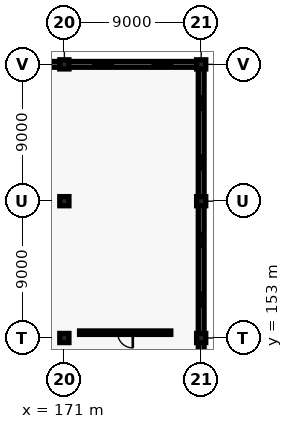
"""IFC4 building model, lengths in metres.
Left out: names, types, materials, properties, quantities, classifications, styles, units other than length and angle.
Written with IfcOpenShell. Run it as: python <this file> out.ifc"""

import sys

from ifc_helpers import new_model, si_unit, direction, frame, frame_2d, origin, origin_2d, place, context, subcontext, project, spatial, rectangle, extrude, element, fill, save


model = new_model("IFC4")
c1 = context("Model", 3, precision=1e-05, world=origin(), true_north=direction((0.0, 1.0)))
c2 = subcontext(c1, "Body", "Model", "MODEL_VIEW")
j1 = project(units=[si_unit("LENGTHUNIT", "METRE"), si_unit("PLANEANGLEUNIT", "RADIAN")], contexts=[c1])
p1 = place(None, origin())
s1 = spatial("IfcSite", under=j1, at=p1, CompositionType="ELEMENT")
p2 = place(p1, origin())
s2 = spatial("IfcBuilding", under=s1, at=p2, CompositionType="ELEMENT")
p3 = place(p2, frame((0.0, 0.0, 5.4)))
s3 = spatial("IfcBuildingStorey", under=s2, at=p3, CompositionType="ELEMENT", Elevation=5.4)
for number, where, z_axis, x_axis in (
    (1, (171.0, 153.0, 0.0), (0.0, 0.0, 1.0), (1.0, 0.0, 0.0)),
    (2, (171.0, 162.0, 0.0), (0.0, 0.0, 1.0), (1.0, 0.0, 0.0)),
    (3, (171.0, 171.0, 0.0), (0.0, 0.0, 1.0), (1.0, 0.0, 0.0)),
    (4, (180.0, 153.0, 0.0), (0.0, 0.0, 1.0), (1.0, 0.0, 0.0)),
    (5, (180.0, 162.0, 0.0), (0.0, 0.0, 1.0), (1.0, 0.0, 0.0)),
    (6, (180.0, 171.0, 0.0), (0.0, 0.0, 1.0), (1.0, 0.0, 0.0)),
):
    element("IfcColumn", number, at=place(p3, frame(where, z_axis=z_axis, x_axis=x_axis)), inside=s3, PredefinedType="COLUMN", context=c2, shape_type="SweptSolid", body=[
        extrude(rectangle(XDim=0.6, YDim=0.6, at=origin_2d()), origin(), (0.0, 0.0, 1.0), 4.2),
    ])
p4 = place(p3, frame((162.06, 171.0, 0.0), z_axis=(0.0, 0.0, 1.0), x_axis=(1.0, 0.0, 0.0)))
e7 = element("IfcWall", 7, at=p4, inside=s3, PredefinedType="SOLIDWALL", context=c2, shape_type="SweptSolid", body=[
    extrude(rectangle(XDim=8.88, YDim=0.38, at=frame_2d((4.44, 0.0))), origin(), (0.0, 0.0, 1.0), 3.4),
])
p5 = place(p4, frame((1.926, 0.0, 0.9)))
e8 = element("IfcOpeningElement", 8, at=p5, cuts=e7, PredefinedType="OPENING", context=c2, shape_type="SweptSolid", body=[
    extrude(rectangle(XDim=1.12, YDim=1.55, at=frame_2d((0.56, 0.775))), frame((0.0, 0.2, 0.0), z_axis=(0.0, -1.0, 0.0), x_axis=(1.0, 0.0, 0.0)), (0.0, 0.0, 1.0), 0.4),
])
p6 = place(p4, frame((5.834, 0.0, 0.9)))
e9 = element("IfcOpeningElement", 9, at=p6, cuts=e7, PredefinedType="OPENING", context=c2, shape_type="SweptSolid", body=[
    extrude(rectangle(XDim=1.12, YDim=1.55, at=frame_2d((0.56, 0.775))), frame((0.0, 0.2, 0.0), z_axis=(0.0, -1.0, 0.0), x_axis=(1.0, 0.0, 0.0)), (0.0, 0.0, 1.0), 0.4),
])
p7 = place(p3, frame((171.06, 171.0, 0.0), z_axis=(0.0, 0.0, 1.0), x_axis=(1.0, 0.0, 0.0)))
e10 = element("IfcWall", 10, at=p7, inside=s3, PredefinedType="SOLIDWALL", context=c2, shape_type="SweptSolid", body=[
    extrude(rectangle(XDim=8.88, YDim=0.38, at=frame_2d((4.44, 0.0))), origin(), (0.0, 0.0, 1.0), 3.4),
])
p8 = place(p7, frame((1.846, 0.0, 0.9)))
e11 = element("IfcOpeningElement", 11, at=p8, cuts=e10, PredefinedType="OPENING", context=c2, shape_type="SweptSolid", body=[
    extrude(rectangle(XDim=1.28, YDim=1.65, at=frame_2d((0.64, 0.825))), frame((0.0, 0.2, 0.0), z_axis=(0.0, -1.0, 0.0), x_axis=(1.0, 0.0, 0.0)), (0.0, 0.0, 1.0), 0.4),
])
p9 = place(p7, frame((5.754, 0.0, 0.9)))
e12 = element("IfcOpeningElement", 12, at=p9, cuts=e10, PredefinedType="OPENING", context=c2, shape_type="SweptSolid", body=[
    extrude(rectangle(XDim=1.28, YDim=1.65, at=frame_2d((0.64, 0.825))), frame((0.0, 0.2, 0.0), z_axis=(0.0, -1.0, 0.0), x_axis=(1.0, 0.0, 0.0)), (0.0, 0.0, 1.0), 0.4),
])
p10 = place(p3, frame((180.0, 144.06, 0.0), z_axis=(0.0, 0.0, 1.0), x_axis=(0.0, 1.0, 0.0)))
e13 = element("IfcWall", 13, at=p10, inside=s3, PredefinedType="SOLIDWALL", context=c2, shape_type="SweptSolid", body=[
    extrude(rectangle(XDim=8.88, YDim=0.38, at=frame_2d((4.44, 0.0))), origin(), (0.0, 0.0, 1.0), 3.4),
])
p11 = place(p10, frame((2.036, 0.0, 0.9)))
e14 = element("IfcOpeningElement", 14, at=p11, cuts=e13, PredefinedType="OPENING", context=c2, shape_type="SweptSolid", body=[
    extrude(rectangle(XDim=0.9, YDim=1.2, at=frame_2d((0.45, 0.6))), frame((0.0, 0.2, 0.0), z_axis=(0.0, -1.0, 0.0), x_axis=(1.0, 0.0, 0.0)), (0.0, 0.0, 1.0), 0.4),
])
p12 = place(p10, frame((5.944, 0.0, 0.9)))
e15 = element("IfcOpeningElement", 15, at=p12, cuts=e13, PredefinedType="OPENING", context=c2, shape_type="SweptSolid", body=[
    extrude(rectangle(XDim=0.9, YDim=1.2, at=frame_2d((0.45, 0.6))), frame((0.0, 0.2, 0.0), z_axis=(0.0, -1.0, 0.0), x_axis=(1.0, 0.0, 0.0)), (0.0, 0.0, 1.0), 0.4),
])
p13 = place(p3, frame((180.0, 153.06, 0.0), z_axis=(0.0, 0.0, 1.0), x_axis=(0.0, 1.0, 0.0)))
e16 = element("IfcWall", 16, at=p13, inside=s3, PredefinedType="SOLIDWALL", context=c2, shape_type="SweptSolid", body=[
    extrude(rectangle(XDim=8.88, YDim=0.38, at=frame_2d((4.44, 0.0))), origin(), (0.0, 0.0, 1.0), 3.4),
])
p14 = place(p13, frame((2.036, 0.0, 0.9)))
e17 = element("IfcOpeningElement", 17, at=p14, cuts=e16, PredefinedType="OPENING", context=c2, shape_type="SweptSolid", body=[
    extrude(rectangle(XDim=0.9, YDim=1.2, at=frame_2d((0.45, 0.6))), frame((0.0, 0.2, 0.0), z_axis=(0.0, -1.0, 0.0), x_axis=(1.0, 0.0, 0.0)), (0.0, 0.0, 1.0), 0.4),
])
p15 = place(p13, frame((5.944, 0.0, 0.9)))
e18 = element("IfcOpeningElement", 18, at=p15, cuts=e16, PredefinedType="OPENING", context=c2, shape_type="SweptSolid", body=[
    extrude(rectangle(XDim=0.9, YDim=1.2, at=frame_2d((0.45, 0.6))), frame((0.0, 0.2, 0.0), z_axis=(0.0, -1.0, 0.0), x_axis=(1.0, 0.0, 0.0)), (0.0, 0.0, 1.0), 0.4),
])
p16 = place(p3, frame((180.0, 162.06, 0.0), z_axis=(0.0, 0.0, 1.0), x_axis=(0.0, 1.0, 0.0)))
e19 = element("IfcWall", 19, at=p16, inside=s3, PredefinedType="SOLIDWALL", context=c2, shape_type="SweptSolid", body=[
    extrude(rectangle(XDim=8.88, YDim=0.38, at=frame_2d((4.44, 0.0))), origin(), (0.0, 0.0, 1.0), 3.4),
])
p17 = place(p16, frame((2.036, 0.0, 0.9)))
e20 = element("IfcOpeningElement", 20, at=p17, cuts=e19, PredefinedType="OPENING", context=c2, shape_type="SweptSolid", body=[
    extrude(rectangle(XDim=0.9, YDim=1.2, at=frame_2d((0.45, 0.6))), frame((0.0, 0.2, 0.0), z_axis=(0.0, -1.0, 0.0), x_axis=(1.0, 0.0, 0.0)), (0.0, 0.0, 1.0), 0.4),
])
p18 = place(p16, frame((5.944, 0.0, 0.9)))
e21 = element("IfcOpeningElement", 21, at=p18, cuts=e19, PredefinedType="OPENING", context=c2, shape_type="SweptSolid", body=[
    extrude(rectangle(XDim=0.9, YDim=1.2, at=frame_2d((0.45, 0.6))), frame((0.0, 0.2, 0.0), z_axis=(0.0, -1.0, 0.0), x_axis=(1.0, 0.0, 0.0)), (0.0, 0.0, 1.0), 0.4),
])
p19 = place(p3, frame((172.0, 153.35, 0.0), z_axis=(0.0, 0.0, 1.0), x_axis=(1.0, 0.0, 0.0)))
e22 = element("IfcWall", 22, at=p19, inside=s3, PredefinedType="PARTITIONING", context=c2, shape_type="SweptSolid", body=[
    extrude(rectangle(XDim=6.0, YDim=0.225, at=frame_2d((3.0, 0.0))), origin(), (0.0, 0.0, 1.0), 3.2),
])
p20 = place(p19, frame((2.5, 0.0, 0.0)))
e23 = element("IfcOpeningElement", 23, at=p20, cuts=e22, PredefinedType="OPENING", context=c2, shape_type="SweptSolid", body=[
    extrude(rectangle(XDim=1.0, YDim=2.1, at=frame_2d((0.5, 1.05))), frame((0.0, 0.123, 0.0), z_axis=(0.0, -1.0, 0.0), x_axis=(1.0, 0.0, 0.0)), (0.0, 0.0, 1.0), 0.245),
])
p21 = place(p8, origin())
e24 = element("IfcWindow", 24, at=p21, inside=s3, PartitioningType="SINGLE_PANEL", PredefinedType="WINDOW", context=c2, shape_type="SweptSolid", body=[
    extrude(rectangle(XDim=1.28, YDim=1.65, at=frame_2d((0.64, 0.825))), frame((0.0, 0.03, 0.0), z_axis=(0.0, -1.0, 0.0), x_axis=(1.0, 0.0, 0.0)), (0.0, 0.0, 1.0), 0.06),
])
fill(e11, e24)
p22 = place(p9, origin())
e25 = element("IfcWindow", 25, at=p22, inside=s3, PartitioningType="SINGLE_PANEL", PredefinedType="WINDOW", context=c2, shape_type="SweptSolid", body=[
    extrude(rectangle(XDim=1.28, YDim=1.65, at=frame_2d((0.64, 0.825))), frame((0.0, 0.03, 0.0), z_axis=(0.0, -1.0, 0.0), x_axis=(1.0, 0.0, 0.0)), (0.0, 0.0, 1.0), 0.06),
])
fill(e12, e25)
p23 = place(p14, origin())
e26 = element("IfcWindow", 26, at=p23, inside=s3, PartitioningType="SINGLE_PANEL", PredefinedType="WINDOW", context=c2, shape_type="SweptSolid", body=[
    extrude(rectangle(XDim=0.9, YDim=1.2, at=frame_2d((0.45, 0.6))), frame((0.0, 0.03, 0.0), z_axis=(0.0, -1.0, 0.0), x_axis=(1.0, 0.0, 0.0)), (0.0, 0.0, 1.0), 0.06),
])
fill(e17, e26)
p24 = place(p15, origin())
e27 = element("IfcWindow", 27, at=p24, inside=s3, PartitioningType="SINGLE_PANEL", PredefinedType="WINDOW", context=c2, shape_type="SweptSolid", body=[
    extrude(rectangle(XDim=0.9, YDim=1.2, at=frame_2d((0.45, 0.6))), frame((0.0, 0.03, 0.0), z_axis=(0.0, -1.0, 0.0), x_axis=(1.0, 0.0, 0.0)), (0.0, 0.0, 1.0), 0.06),
])
fill(e18, e27)
p25 = place(p17, origin())
e28 = element("IfcWindow", 28, at=p25, inside=s3, PartitioningType="SINGLE_PANEL", PredefinedType="WINDOW", context=c2, shape_type="SweptSolid", body=[
    extrude(rectangle(XDim=0.9, YDim=1.2, at=frame_2d((0.45, 0.6))), frame((0.0, 0.03, 0.0), z_axis=(0.0, -1.0, 0.0), x_axis=(1.0, 0.0, 0.0)), (0.0, 0.0, 1.0), 0.06),
])
fill(e20, e28)
p26 = place(p18, origin())
e29 = element("IfcWindow", 29, at=p26, inside=s3, PartitioningType="SINGLE_PANEL", PredefinedType="WINDOW", context=c2, shape_type="SweptSolid", body=[
    extrude(rectangle(XDim=0.9, YDim=1.2, at=frame_2d((0.45, 0.6))), frame((0.0, 0.03, 0.0), z_axis=(0.0, -1.0, 0.0), x_axis=(1.0, 0.0, 0.0)), (0.0, 0.0, 1.0), 0.06),
])
fill(e21, e29)
p27 = place(p20, origin())
e30 = element("IfcDoor", 30, at=p27, inside=s3, OperationType="SINGLE_SWING_RIGHT", PredefinedType="DOOR", context=c2, shape_type="SweptSolid", body=[
    extrude(rectangle(XDim=1.0, YDim=2.1, at=frame_2d((0.5, 1.05))), frame((0.0, 0.025, 0.0), z_axis=(0.0, -1.0, 0.0), x_axis=(1.0, 0.0, 0.0)), (0.0, 0.0, 1.0), 0.05),
])
fill(e23, e30)
save(model, sys.argv[1])
